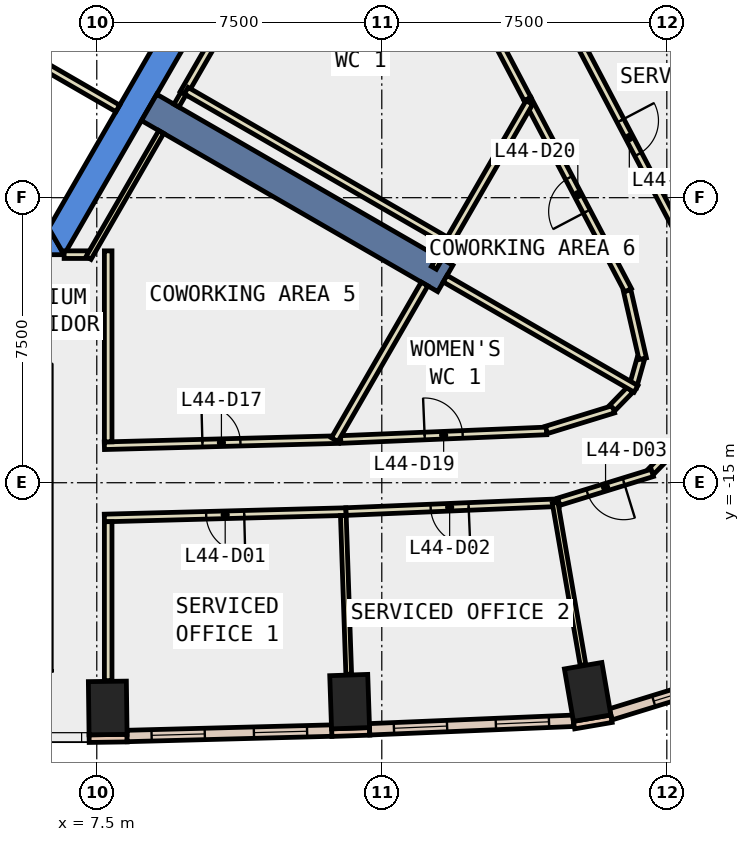
"""IFC4 building model, lengths in metres.
Left out: names, types, materials, properties, quantities, classifications, styles, units other than length and angle.
Written with IfcOpenShell. Run it as: python <this file> out.ifc"""

import sys

from ifc_helpers import new_model, si_unit, direction, frame, frame_2d, origin, origin_2d, place, context, subcontext, project, spatial, polyline, rectangle, outline, extrude, element, fill, save


model = new_model("IFC4")
c1 = context("Model", 3, precision=1e-05, world=origin(), true_north=direction((0.0, 1.0)))
c2 = subcontext(c1, "Body", "Model", "MODEL_VIEW")
j1 = project(units=[si_unit("LENGTHUNIT", "METRE"), si_unit("PLANEANGLEUNIT", "RADIAN")], contexts=[c1])
p1 = place(None, origin())
s1 = spatial("IfcSite", under=j1, at=p1, CompositionType="ELEMENT")
p2 = place(p1, origin())
s2 = spatial("IfcBuilding", under=s1, at=p2, CompositionType="ELEMENT")
p3 = place(p2, frame((0.0, 0.0, 198.2)))
s3 = spatial("IfcBuildingStorey", under=s2, at=p3, CompositionType="ELEMENT", Elevation=198.2)
for number, where, z_axis, x_axis in (
    (1, (7.788, -20.927, -0.4), (0.0, 0.0, 1.0), (1.0, 0.013, 0.0)),
    (2, (14.154, -20.76, -0.4), (0.0, 0.0, 1.0), (0.999, 0.034, 0.0)),
    (3, (20.417, -20.505, -0.4), (0.0, 0.0, 1.0), (0.986, 0.169, 0.0)),
):
    element("IfcColumn", number, at=place(p3, frame(where, z_axis=z_axis, x_axis=x_axis)), inside=s3, PredefinedType="COLUMN", context=c2, shape_type="SweptSolid", body=[
        extrude(rectangle(XDim=1.0, YDim=1.4, at=origin_2d()), origin(), (0.0, 0.0, 1.0), 4.2),
    ])
p4 = place(p3, frame((0.0, 0.0, -0.4)))
e4 = element("IfcWall", 4, at=p4, inside=s3, PredefinedType="SHEAR", context=c2, shape_type="SweptSolid", body=[
    extrude(outline(polyline([(5.75, -8.3), (5.75, -9.0), (6.64, -9.0), (6.235, -8.3), (5.75, -8.3)])), origin(), (0.0, 0.0, 1.0), 4.2),
])
p5 = place(p3, frame((0.0, 0.0, -0.4)))
e5 = element("IfcWall", 5, at=p5, inside=s3, PredefinedType="SHEAR", context=c2, shape_type="SweptSolid", body=[
    extrude(outline(polyline([(6.64, -9.0), (13.279, 2.5), (12.471, 2.5), (6.235, -8.3), (6.64, -9.0)])), origin(), (0.0, 0.0, 1.0), 4.2),
])
p6 = place(p3, frame((8.877, -5.125, -0.4), z_axis=(0.0, 0.0, 1.0), x_axis=(0.866017533419, -0.500013631625, 0.0)))
e6 = element("IfcWall", 6, at=p6, inside=s3, PredefinedType="SHEAR", context=c2, shape_type="SweptSolid", body=[
    extrude(rectangle(XDim=9.0, YDim=0.8, at=frame_2d((4.5, 0.0))), origin(), (0.0, 0.0, 1.0), 4.2),
])
p7 = place(p3, frame((7.299, -21.734, 0.0), z_axis=(0.0, 0.0, 1.0), x_axis=(0.999903186316, 0.013914668364, 0.0)))
e7 = element("IfcWall", 7, at=p7, inside=s3, PredefinedType="STANDARD", context=c2, shape_type="SweptSolid", body=[
    extrude(rectangle(XDim=1.0, YDim=0.2, at=frame_2d((0.5, 0.0))), origin(), (0.0, 0.0, 1.0), 3.8),
])
p8 = place(p3, frame((13.682, -21.576, 0.0), z_axis=(0.0, 0.0, 1.0), x_axis=(0.999423561854, 0.033949138587, 0.0)))
e8 = element("IfcWall", 8, at=p8, inside=s3, PredefinedType="STANDARD", context=c2, shape_type="SweptSolid", body=[
    extrude(rectangle(XDim=1.0, YDim=0.2, at=frame_2d((0.5, 0.0))), origin(), (0.0, 0.0, 1.0), 3.8),
])
p9 = place(p3, frame((20.059, -21.378, 0.0), z_axis=(0.0, 0.0, 1.0), x_axis=(0.985631544579, 0.168909615862, 0.0)))
e9 = element("IfcWall", 9, at=p9, inside=s3, PredefinedType="STANDARD", context=c2, shape_type="SweptSolid", body=[
    extrude(rectangle(XDim=1.0, YDim=0.2, at=frame_2d((0.5, 0.0))), origin(), (0.0, 0.0, 1.0), 3.8),
])
p10 = place(p3, frame((8.297, -21.664, 0.0), z_axis=(0.0, 0.0, 1.0), x_axis=(0.999651908676, 0.026382977093, 0.0)))
e10 = element("IfcWall", 10, at=p10, inside=s3, PredefinedType="STANDARD", context=c2, shape_type="SweptSolid", body=[
    extrude(rectangle(XDim=5.386, YDim=0.3, at=frame_2d((2.693, 0.0))), origin(), (0.0, 0.0, 1.0), 3.8),
])
p11 = place(p10, frame((0.646, 0.0, 0.9)))
e11 = element("IfcOpeningElement", 11, at=p11, cuts=e10, PredefinedType="OPENING", context=c2, shape_type="SweptSolid", body=[
    extrude(rectangle(XDim=1.4, YDim=2.6, at=frame_2d((0.7, 1.3))), frame((0.0, 0.16, 0.0), z_axis=(0.0, -1.0, 0.0), x_axis=(1.0, 0.0, 0.0)), (0.0, 0.0, 1.0), 0.32),
])
p12 = place(p10, frame((3.339, 0.0, 0.9)))
e12 = element("IfcOpeningElement", 12, at=p12, cuts=e10, PredefinedType="OPENING", context=c2, shape_type="SweptSolid", body=[
    extrude(rectangle(XDim=1.4, YDim=2.6, at=frame_2d((0.7, 1.3))), frame((0.0, 0.16, 0.0), z_axis=(0.0, -1.0, 0.0), x_axis=(1.0, 0.0, 0.0)), (0.0, 0.0, 1.0), 0.32),
])
p13 = place(p3, frame((14.678, -21.488, 0.0), z_axis=(0.0, 0.0, 1.0), x_axis=(0.999127941775, 0.041753514387, 0.0)))
e13 = element("IfcWall", 13, at=p13, inside=s3, PredefinedType="STANDARD", context=c2, shape_type="SweptSolid", body=[
    extrude(rectangle(XDim=5.368, YDim=0.3, at=frame_2d((2.684, 0.0))), origin(), (0.0, 0.0, 1.0), 3.8),
])
p14 = place(p13, frame((0.642, 0.0, 0.9)))
e14 = element("IfcOpeningElement", 14, at=p14, cuts=e13, PredefinedType="OPENING", context=c2, shape_type="SweptSolid", body=[
    extrude(rectangle(XDim=1.4, YDim=2.6, at=frame_2d((0.7, 1.3))), frame((0.0, 0.16, 0.0), z_axis=(0.0, -1.0, 0.0), x_axis=(1.0, 0.0, 0.0)), (0.0, 0.0, 1.0), 0.32),
])
p15 = place(p13, frame((3.326, 0.0, 0.9)))
e15 = element("IfcOpeningElement", 15, at=p15, cuts=e13, PredefinedType="OPENING", context=c2, shape_type="SweptSolid", body=[
    extrude(rectangle(XDim=1.4, YDim=2.6, at=frame_2d((0.7, 1.3))), frame((0.0, 0.16, 0.0), z_axis=(0.0, -1.0, 0.0), x_axis=(1.0, 0.0, 0.0)), (0.0, 0.0, 1.0), 0.32),
])
p16 = place(p3, frame((21.024, -21.095, 0.0), z_axis=(0.0, 0.0, 1.0), x_axis=(0.955692086233, 0.29436819854, 0.0)))
e16 = element("IfcWall", 16, at=p16, inside=s3, PredefinedType="STANDARD", context=c2, shape_type="SweptSolid", body=[
    extrude(rectangle(XDim=3.767, YDim=0.3, at=frame_2d((1.884, 0.0))), origin(), (0.0, 0.0, 1.0), 3.8),
])
p17 = place(p16, frame((1.183, 0.0, 0.9)))
e17 = element("IfcOpeningElement", 17, at=p17, cuts=e16, PredefinedType="OPENING", context=c2, shape_type="SweptSolid", body=[
    extrude(rectangle(XDim=1.4, YDim=2.6, at=frame_2d((0.7, 1.3))), frame((0.0, 0.16, 0.0), z_axis=(0.0, -1.0, 0.0), x_axis=(1.0, 0.0, 0.0)), (0.0, 0.0, 1.0), 0.32),
])
p18 = place(p3, frame((7.7, -14.027, 0.0), z_axis=(0.0, 0.0, 1.0), x_axis=(0.999653919353, 0.026306682088, 0.0)))
e18 = element("IfcWall", 18, at=p18, inside=s3, PredefinedType="PARTITIONING", context=c2, shape_type="SweptSolid", body=[
    extrude(rectangle(XDim=6.162, YDim=0.2, at=frame_2d((3.081, 0.0))), origin(), (0.0, 0.0, 1.0), 3.8),
])
p19 = place(p18, frame((2.581, 0.0, 0.0)))
e19 = element("IfcOpeningElement", 19, at=p19, cuts=e18, PredefinedType="OPENING", context=c2, shape_type="SweptSolid", body=[
    extrude(rectangle(XDim=1.0, YDim=2.1, at=frame_2d((0.5, 1.05))), frame((0.0, 0.11, 0.0), z_axis=(0.0, -1.0, 0.0), x_axis=(1.0, 0.0, 0.0)), (0.0, 0.0, 1.0), 0.22),
])
p20 = place(p3, frame((18.836, -4.906, 0.0), z_axis=(0.0, 0.0, 1.0), x_axis=(-0.465843561357, 0.884867095299, 0.0)))
e20 = element("IfcWall", 20, at=p20, inside=s3, PredefinedType="PARTITIONING", context=c2, shape_type="SweptSolid", body=[
    extrude(rectangle(XDim=1.554, YDim=0.2, at=frame_2d((0.777, 0.0))), origin(), (0.0, 0.0, 1.0), 3.8),
])
p21 = place(p3, frame((13.919, -13.863, 0.0), z_axis=(0.0, 0.0, 1.0), x_axis=(0.999130261307, 0.041697972867, 0.0)))
e21 = element("IfcWall", 21, at=p21, inside=s3, PredefinedType="PARTITIONING", context=c2, shape_type="SweptSolid", body=[
    extrude(rectangle(XDim=5.422, YDim=0.2, at=frame_2d((2.711, 0.0))), origin(), (0.0, 0.0, 1.0), 3.8),
])
p22 = place(p21, frame((2.211, 0.0, 0.0)))
e22 = element("IfcOpeningElement", 22, at=p22, cuts=e21, PredefinedType="OPENING", context=c2, shape_type="SweptSolid", body=[
    extrude(rectangle(XDim=1.0, YDim=2.1, at=frame_2d((0.5, 1.05))), frame((0.0, 0.11, 0.0), z_axis=(0.0, -1.0, 0.0), x_axis=(1.0, 0.0, 0.0)), (0.0, 0.0, 1.0), 0.22),
])
p23 = place(p3, frame((19.332, -13.611, 0.0), z_axis=(0.0, 0.0, 1.0), x_axis=(0.955790442908, 0.294048685161, 0.0)))
e23 = element("IfcWall", 23, at=p23, inside=s3, PredefinedType="PARTITIONING", context=c2, shape_type="SweptSolid", body=[
    extrude(rectangle(XDim=1.846, YDim=0.2, at=frame_2d((0.923, 0.0))), origin(), (0.0, 0.0, 1.0), 3.8),
])
p24 = place(p3, frame((21.072, -13.026, 0.0), z_axis=(0.0, 0.0, 1.0), x_axis=(0.697252405765, 0.716825698936, 0.0)))
e24 = element("IfcWall", 24, at=p24, inside=s3, PredefinedType="PARTITIONING", context=c2, shape_type="SweptSolid", body=[
    extrude(rectangle(XDim=0.661, YDim=0.2, at=frame_2d((0.331, 0.0))), origin(), (0.0, 0.0, 1.0), 3.8),
])
p25 = place(p3, frame((21.608, -12.476, 0.0), z_axis=(0.0, 0.0, 1.0), x_axis=(0.270277025631, 0.962782597171, 0.0)))
e25 = element("IfcWall", 25, at=p25, inside=s3, PredefinedType="PARTITIONING", context=c2, shape_type="SweptSolid", body=[
    extrude(rectangle(XDim=0.77, YDim=0.2, at=frame_2d((0.385, 0.0))), origin(), (0.0, 0.0, 1.0), 3.8),
])
p26 = place(p3, frame((21.866, -11.737, 0.0), z_axis=(0.0, 0.0, 1.0), x_axis=(-0.222871656966, 0.974847795567, 0.0)))
e26 = element("IfcWall", 26, at=p26, inside=s3, PredefinedType="PARTITIONING", context=c2, shape_type="SweptSolid", body=[
    extrude(rectangle(XDim=1.839, YDim=0.2, at=frame_2d((0.919, 0.0))), origin(), (0.0, 0.0, 1.0), 3.8),
])
p27 = place(p3, frame((21.48, -9.935, 0.0), z_axis=(0.0, 0.0, 1.0), x_axis=(-0.465356775138, 0.885123195851, 0.0)))
e27 = element("IfcWall", 27, at=p27, inside=s3, PredefinedType="PARTITIONING", context=c2, shape_type="SweptSolid", body=[
    extrude(rectangle(XDim=5.682, YDim=0.2, at=frame_2d((2.841, 0.0))), origin(), (0.0, 0.0, 1.0), 3.8),
])
p28 = place(p27, frame((2.341, 0.0, 0.0)))
e28 = element("IfcOpeningElement", 28, at=p28, cuts=e27, PredefinedType="OPENING", context=c2, shape_type="SweptSolid", body=[
    extrude(rectangle(XDim=1.0, YDim=2.1, at=frame_2d((0.5, 1.05))), frame((0.0, 0.11, 0.0), z_axis=(0.0, -1.0, 0.0), x_axis=(1.0, 0.0, 0.0)), (0.0, 0.0, 1.0), 0.22),
])
p29 = place(p3, frame((14.059, -15.76, 0.0), z_axis=(0.0, 0.0, 1.0), x_axis=(-0.999651338269, -0.026404580978, 0.0)))
e29 = element("IfcWall", 29, at=p29, inside=s3, PredefinedType="PARTITIONING", context=c2, shape_type="SweptSolid", body=[
    extrude(rectangle(XDim=6.361, YDim=0.2, at=frame_2d((3.181, 0.0))), origin(), (0.0, 0.0, 1.0), 3.8),
])
p30 = place(p29, frame((2.681, 0.0, 0.0)))
e30 = element("IfcOpeningElement", 30, at=p30, cuts=e29, PredefinedType="OPENING", context=c2, shape_type="SweptSolid", body=[
    extrude(rectangle(XDim=1.0, YDim=2.1, at=frame_2d((0.5, 1.05))), frame((0.0, 0.11, 0.0), z_axis=(0.0, -1.0, 0.0), x_axis=(1.0, 0.0, 0.0)), (0.0, 0.0, 1.0), 0.22),
])
p31 = place(p3, frame((19.661, -15.525, 0.0), z_axis=(0.0, 0.0, 1.0), x_axis=(-0.999127706659, -0.041759140148, 0.0)))
e31 = element("IfcWall", 31, at=p31, inside=s3, PredefinedType="PARTITIONING", context=c2, shape_type="SweptSolid", body=[
    extrude(rectangle(XDim=5.607, YDim=0.2, at=frame_2d((2.803, 0.0))), origin(), (0.0, 0.0, 1.0), 3.8),
])
p32 = place(p31, frame((2.378, 0.0, 0.0)))
e32 = element("IfcOpeningElement", 32, at=p32, cuts=e31, PredefinedType="OPENING", context=c2, shape_type="SweptSolid", body=[
    extrude(rectangle(XDim=1.0, YDim=2.1, at=frame_2d((0.5, 1.05))), frame((0.0, 0.11, 0.0), z_axis=(0.0, -1.0, 0.0), x_axis=(1.0, 0.0, 0.0)), (0.0, 0.0, 1.0), 0.22),
])
p33 = place(p3, frame((23.236, -13.528, 0.0), z_axis=(0.0, 0.0, 1.0), x_axis=(-0.698551276451, -0.715560000397, 0.0)))
e33 = element("IfcWall", 33, at=p33, inside=s3, PredefinedType="PARTITIONING", context=c2, shape_type="SweptSolid", body=[
    extrude(rectangle(XDim=1.636, YDim=0.2, at=frame_2d((0.818, 0.0))), origin(), (0.0, 0.0, 1.0), 3.8),
])
p34 = place(p3, frame((22.119, -14.741, 0.0), z_axis=(0.0, 0.0, 1.0), x_axis=(-0.955612889251, -0.294625195625, 0.0)))
e34 = element("IfcWall", 34, at=p34, inside=s3, PredefinedType="PARTITIONING", context=c2, shape_type="SweptSolid", body=[
    extrude(rectangle(XDim=2.576, YDim=0.2, at=frame_2d((1.288, 0.0))), origin(), (0.0, 0.0, 1.0), 3.8),
])
p35 = place(p34, frame((0.788, 0.0, 0.0)))
e35 = element("IfcOpeningElement", 35, at=p35, cuts=e34, PredefinedType="OPENING", context=c2, shape_type="SweptSolid", body=[
    extrude(rectangle(XDim=1.0, YDim=2.1, at=frame_2d((0.5, 1.05))), frame((0.0, 0.11, 0.0), z_axis=(0.0, -1.0, 0.0), x_axis=(1.0, 0.0, 0.0)), (0.0, 0.0, 1.0), 0.22),
])
p36 = place(p3, frame((19.75, -2.563, 0.0), z_axis=(0.0, 0.0, 1.0), x_axis=(0.465444987791, -0.885076812113, 0.0)))
e36 = element("IfcWall", 36, at=p36, inside=s3, PredefinedType="PARTITIONING", context=c2, shape_type="SweptSolid", body=[
    extrude(rectangle(XDim=7.578, YDim=0.2, at=frame_2d((3.789, 0.0))), origin(), (0.0, 0.0, 1.0), 3.8),
])
p37 = place(p36, frame((3.289, 0.0, 0.0)))
e37 = element("IfcOpeningElement", 37, at=p37, cuts=e36, PredefinedType="OPENING", context=c2, shape_type="SweptSolid", body=[
    extrude(rectangle(XDim=1.0, YDim=2.1, at=frame_2d((0.5, 1.05))), frame((0.0, 0.11, 0.0), z_axis=(0.0, -1.0, 0.0), x_axis=(1.0, 0.0, 0.0)), (0.0, 0.0, 1.0), 0.22),
])
p38 = place(p3, frame((8.053, -5.152, 0.0), z_axis=(0.0, 0.0, 1.0), x_axis=(-0.866022959057, 0.500004234368, 0.0)))
e38 = element("IfcWall", 38, at=p38, inside=s3, PredefinedType="PARTITIONING", context=c2, shape_type="SweptSolid", body=[
    extrude(rectangle(XDim=2.5, YDim=0.2, at=frame_2d((1.25, 0.0))), origin(), (0.0, 0.0, 1.0), 3.8),
])
p39 = place(p3, frame((5.751, -3.938, 0.0), z_axis=(0.0, 0.0, 1.0), x_axis=(0.49994636267, 0.866056369097, 0.0)))
e39 = element("IfcWall", 39, at=p39, inside=s3, PredefinedType="PARTITIONING", context=c2, shape_type="SweptSolid", body=[
    extrude(rectangle(XDim=2.8, YDim=0.2, at=frame_2d((1.4, 0.0))), origin(), (0.0, 0.0, 1.0), 3.8),
])
p40 = place(p3, frame((6.641, -8.999, 0.0), z_axis=(0.0, 0.0, 1.0), x_axis=(1.0, 0.0, 0.0)))
e40 = element("IfcWall", 40, at=p40, inside=s3, PredefinedType="PARTITIONING", context=c2, shape_type="SweptSolid", body=[
    extrude(rectangle(XDim=0.617, YDim=0.2, at=frame_2d((0.309, 0.0))), origin(), (0.0, 0.0, 1.0), 3.8),
])
p41 = place(p3, frame((7.283, -9.086, 0.0), z_axis=(0.0, 0.0, 1.0), x_axis=(0.499843936326, 0.866115488442, 0.0)))
e41 = element("IfcWall", 41, at=p41, inside=s3, PredefinedType="PARTITIONING", context=c2, shape_type="SweptSolid", body=[
    extrude(rectangle(XDim=3.827, YDim=0.15, at=frame_2d((1.914, 0.0))), origin(), (0.0, 0.0, 1.0), 3.8),
])
p42 = place(p3, frame((9.781, -4.758, 0.0), z_axis=(0.0, 0.0, 1.0), x_axis=(0.50003174578, 0.866007074574, 0.0)))
e42 = element("IfcWall", 42, at=p42, inside=s3, PredefinedType="PARTITIONING", context=c2, shape_type="SweptSolid", body=[
    extrude(rectangle(XDim=9.315, YDim=0.2, at=frame_2d((4.658, 0.0))), origin(), (0.0, 0.0, 1.0), 3.8),
])
p43 = place(p3, frame((7.8, -8.899, 0.0), z_axis=(0.0, 0.0, 1.0), x_axis=(0.0, -1.0, 0.0)))
e43 = element("IfcWall", 43, at=p43, inside=s3, PredefinedType="PARTITIONING", context=c2, shape_type="SweptSolid", body=[
    extrude(rectangle(XDim=5.025, YDim=0.2, at=frame_2d((2.513, 0.0))), origin(), (0.0, 0.0, 1.0), 3.8),
])
p44 = place(p3, frame((7.8, -16.025, 0.0), z_axis=(0.0, 0.0, 1.0), x_axis=(0.0, -1.0, 0.0)))
e44 = element("IfcWall", 44, at=p44, inside=s3, PredefinedType="PARTITIONING", context=c2, shape_type="SweptSolid", body=[
    extrude(rectangle(XDim=4.182, YDim=0.2, at=frame_2d((2.091, 0.0))), origin(), (0.0, 0.0, 1.0), 3.8),
])
p45 = place(p3, frame((9.853, -4.684, 0.0), z_axis=(0.0, 0.0, 1.0), x_axis=(0.865999791918, -0.500044358431, 0.0)))
e45 = element("IfcWall", 45, at=p45, inside=s3, PredefinedType="PARTITIONING", context=c2, shape_type="SweptSolid", body=[
    extrude(rectangle(XDim=8.075, YDim=0.2, at=frame_2d((4.038, 0.0))), origin(), (0.0, 0.0, 1.0), 3.8),
])
p46 = place(p3, frame((16.125, -9.771, 0.0), z_axis=(0.0, 0.0, 1.0), x_axis=(-0.500030759312, -0.866007644159, 0.0)))
e46 = element("IfcWall", 46, at=p46, inside=s3, PredefinedType="PARTITIONING", context=c2, shape_type="SweptSolid", body=[
    extrude(rectangle(XDim=4.73, YDim=0.2, at=frame_2d((2.365, 0.0))), origin(), (0.0, 0.0, 1.0), 3.8),
])
p47 = place(p3, frame((16.71, -8.758, 0.0), z_axis=(0.0, 0.0, 1.0), x_axis=(-0.500013496215, -0.866017611601, 0.0)))
e47 = element("IfcWall", 47, at=p47, inside=s3, PredefinedType="PARTITIONING", context=c2, shape_type="SweptSolid", body=[
    extrude(rectangle(XDim=0.678, YDim=0.15, at=frame_2d((0.339, 0.0))), origin(), (0.0, 0.0, 1.0), 3.8),
])
p48 = place(p3, frame((18.882, -4.995, 0.0), z_axis=(0.0, 0.0, 1.0), x_axis=(-0.499895813511, -0.866085547527, 0.0)))
e48 = element("IfcWall", 48, at=p48, inside=s3, PredefinedType="PARTITIONING", context=c2, shape_type="SweptSolid", body=[
    extrude(rectangle(XDim=4.145, YDim=0.2, at=frame_2d((2.073, 0.0))), origin(), (0.0, 0.0, 1.0), 3.8),
])
p49 = place(p3, frame((16.667, -9.631, 0.0), z_axis=(0.0, 0.0, 1.0), x_axis=(0.866032775405, -0.499987231761, 0.0)))
e49 = element("IfcWall", 49, at=p49, inside=s3, PredefinedType="PARTITIONING", context=c2, shape_type="SweptSolid", body=[
    extrude(rectangle(XDim=5.8, YDim=0.2, at=frame_2d((2.9, 0.0))), origin(), (0.0, 0.0, 1.0), 3.8),
])
p50 = place(p3, frame((13.988, -15.862, 0.0), z_axis=(0.0, 0.0, 1.0), x_axis=(0.033931247732, -0.999424169423, 0.0)))
e50 = element("IfcWall", 50, at=p50, inside=s3, PredefinedType="PARTITIONING", context=c2, shape_type="SweptSolid", body=[
    extrude(rectangle(XDim=4.18, YDim=0.15, at=frame_2d((2.09, 0.0))), origin(), (0.0, 0.0, 1.0), 3.8),
])
p51 = place(p3, frame((19.561, -15.529, 0.0), z_axis=(0.0, 0.0, 1.0), x_axis=(0.169546150064, -0.98552224886, 0.0)))
e51 = element("IfcWall", 51, at=p51, inside=s3, PredefinedType="PARTITIONING", context=c2, shape_type="SweptSolid", body=[
    extrude(rectangle(XDim=4.329, YDim=0.15, at=frame_2d((2.164, 0.0))), origin(), (0.0, 0.0, 1.0), 3.8),
])
p52 = place(p3, frame((9.596, -5.078, 0.0), z_axis=(0.0, 0.0, 1.0), x_axis=(0.500827895298, 0.86554689029, 0.0)))
e52 = element("IfcWall", 52, at=p52, inside=s3, PredefinedType="PARTITIONING", context=c2, shape_type="SweptSolid", body=[
    extrude(rectangle(XDim=0.369, YDim=0.15, at=frame_2d((0.185, 0.0))), origin(), (0.0, 0.0, 1.0), 3.8),
])
p53 = place(p3, frame((5.492, -3.788, 0.0), z_axis=(0.0, 0.0, 1.0), x_axis=(0.500034260056, 0.866005622828, 0.0)))
e53 = element("IfcWall", 53, at=p53, inside=s3, PredefinedType="STANDARD", context=c2, shape_type="SweptSolid", body=[
    extrude(rectangle(XDim=5.399, YDim=0.2, at=frame_2d((2.7, 0.0))), origin(), (0.0, 0.0, 1.0), 3.8),
])
p54 = place(p11, origin())
e54 = element("IfcWindow", 54, at=p54, inside=s3, PartitioningType="SINGLE_PANEL", PredefinedType="WINDOW", context=c2, shape_type="SweptSolid", body=[
    extrude(rectangle(XDim=1.4, YDim=2.6, at=frame_2d((0.7, 1.3))), frame((0.0, 0.03, 0.0), z_axis=(0.0, -1.0, 0.0), x_axis=(1.0, 0.0, 0.0)), (0.0, 0.0, 1.0), 0.06),
])
fill(e11, e54)
p55 = place(p12, origin())
e55 = element("IfcWindow", 55, at=p55, inside=s3, PartitioningType="SINGLE_PANEL", PredefinedType="WINDOW", context=c2, shape_type="SweptSolid", body=[
    extrude(rectangle(XDim=1.4, YDim=2.6, at=frame_2d((0.7, 1.3))), frame((0.0, 0.03, 0.0), z_axis=(0.0, -1.0, 0.0), x_axis=(1.0, 0.0, 0.0)), (0.0, 0.0, 1.0), 0.06),
])
fill(e12, e55)
p56 = place(p14, origin())
e56 = element("IfcWindow", 56, at=p56, inside=s3, PartitioningType="SINGLE_PANEL", PredefinedType="WINDOW", context=c2, shape_type="SweptSolid", body=[
    extrude(rectangle(XDim=1.4, YDim=2.6, at=frame_2d((0.7, 1.3))), frame((0.0, 0.03, 0.0), z_axis=(0.0, -1.0, 0.0), x_axis=(1.0, 0.0, 0.0)), (0.0, 0.0, 1.0), 0.06),
])
fill(e14, e56)
p57 = place(p15, origin())
e57 = element("IfcWindow", 57, at=p57, inside=s3, PartitioningType="SINGLE_PANEL", PredefinedType="WINDOW", context=c2, shape_type="SweptSolid", body=[
    extrude(rectangle(XDim=1.4, YDim=2.6, at=frame_2d((0.7, 1.3))), frame((0.0, 0.03, 0.0), z_axis=(0.0, -1.0, 0.0), x_axis=(1.0, 0.0, 0.0)), (0.0, 0.0, 1.0), 0.06),
])
fill(e15, e57)
p58 = place(p17, origin())
e58 = element("IfcWindow", 58, at=p58, inside=s3, PartitioningType="SINGLE_PANEL", PredefinedType="WINDOW", context=c2, shape_type="SweptSolid", body=[
    extrude(rectangle(XDim=1.4, YDim=2.6, at=frame_2d((0.7, 1.3))), frame((0.0, 0.03, 0.0), z_axis=(0.0, -1.0, 0.0), x_axis=(1.0, 0.0, 0.0)), (0.0, 0.0, 1.0), 0.06),
])
fill(e17, e58)
p59 = place(p30, origin())
e59 = element("IfcDoor", 59, at=p59, inside=s3, OperationType="SINGLE_SWING_LEFT", PredefinedType="DOOR", context=c2, shape_type="SweptSolid", body=[
    extrude(rectangle(XDim=1.0, YDim=2.1, at=frame_2d((0.5, 1.05))), frame((0.0, 0.025, 0.0), z_axis=(0.0, -1.0, 0.0), x_axis=(1.0, 0.0, 0.0)), (0.0, 0.0, 1.0), 0.05),
])
fill(e30, e59)
p60 = place(p32, origin())
e60 = element("IfcDoor", 60, at=p60, inside=s3, OperationType="SINGLE_SWING_LEFT", PredefinedType="DOOR", context=c2, shape_type="SweptSolid", body=[
    extrude(rectangle(XDim=1.0, YDim=2.1, at=frame_2d((0.5, 1.05))), frame((0.0, 0.025, 0.0), z_axis=(0.0, -1.0, 0.0), x_axis=(1.0, 0.0, 0.0)), (0.0, 0.0, 1.0), 0.05),
])
fill(e32, e60)
p61 = place(p35, origin())
e61 = element("IfcDoor", 61, at=p61, inside=s3, OperationType="SINGLE_SWING_LEFT", PredefinedType="DOOR", context=c2, shape_type="SweptSolid", body=[
    extrude(rectangle(XDim=1.0, YDim=2.1, at=frame_2d((0.5, 1.05))), frame((0.0, 0.025, 0.0), z_axis=(0.0, -1.0, 0.0), x_axis=(1.0, 0.0, 0.0)), (0.0, 0.0, 1.0), 0.05),
])
fill(e35, e61)
p62 = place(p37, origin())
e62 = element("IfcDoor", 62, at=p62, inside=s3, OperationType="SINGLE_SWING_LEFT", PredefinedType="DOOR", context=c2, shape_type="SweptSolid", body=[
    extrude(rectangle(XDim=1.0, YDim=2.1, at=frame_2d((0.5, 1.05))), frame((0.0, 0.025, 0.0), z_axis=(0.0, -1.0, 0.0), x_axis=(1.0, 0.0, 0.0)), (0.0, 0.0, 1.0), 0.05),
])
fill(e37, e62)
p63 = place(p19, origin())
e63 = element("IfcDoor", 63, at=p63, inside=s3, OperationType="SINGLE_SWING_LEFT", PredefinedType="DOOR", context=c2, shape_type="SweptSolid", body=[
    extrude(rectangle(XDim=1.0, YDim=2.1, at=frame_2d((0.5, 1.05))), frame((0.0, 0.025, 0.0), z_axis=(0.0, -1.0, 0.0), x_axis=(1.0, 0.0, 0.0)), (0.0, 0.0, 1.0), 0.05),
])
fill(e19, e63)
p64 = place(p22, origin())
e64 = element("IfcDoor", 64, at=p64, inside=s3, OperationType="SINGLE_SWING_LEFT", PredefinedType="DOOR", context=c2, shape_type="SweptSolid", body=[
    extrude(rectangle(XDim=1.0, YDim=2.1, at=frame_2d((0.5, 1.05))), frame((0.0, 0.025, 0.0), z_axis=(0.0, -1.0, 0.0), x_axis=(1.0, 0.0, 0.0)), (0.0, 0.0, 1.0), 0.05),
])
fill(e22, e64)
p65 = place(p28, origin())
e65 = element("IfcDoor", 65, at=p65, inside=s3, OperationType="SINGLE_SWING_LEFT", PredefinedType="DOOR", context=c2, shape_type="SweptSolid", body=[
    extrude(rectangle(XDim=1.0, YDim=2.1, at=frame_2d((0.5, 1.05))), frame((0.0, 0.025, 0.0), z_axis=(0.0, -1.0, 0.0), x_axis=(1.0, 0.0, 0.0)), (0.0, 0.0, 1.0), 0.05),
])
fill(e28, e65)
save(model, sys.argv[1])
